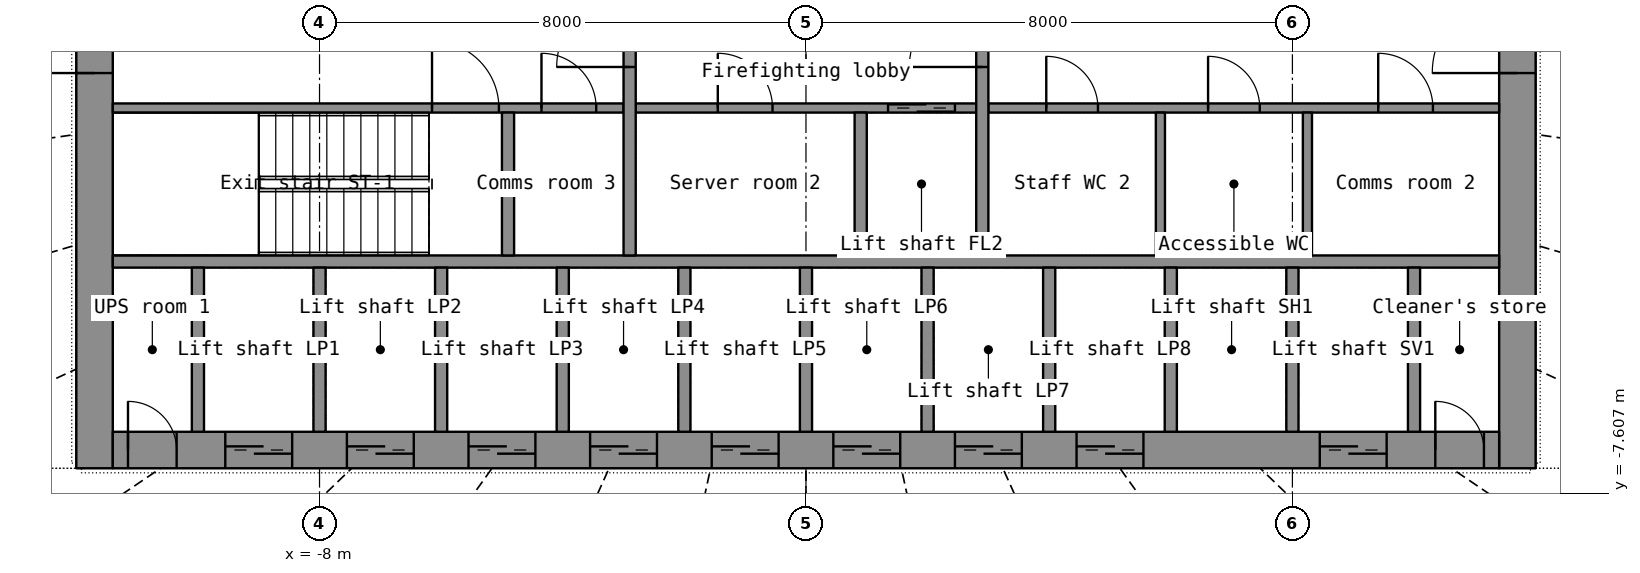
"""IFC4 building model, lengths in metres.
Left out: names, types, materials, properties, quantities, classifications, styles, units other than length and angle.
Written with IfcOpenShell. Run it as: python <this file> out.ifc"""

import sys

from ifc_helpers import new_model, si_unit, direction, frame, frame_2d, origin, place, context, subcontext, project, spatial, rectangle, extrude, element, fill, save


model = new_model("IFC4")
c1 = context("Model", 3, precision=1e-05, world=origin(), true_north=direction((0.0, 1.0)))
c2 = subcontext(c1, "Body", "Model", "MODEL_VIEW")
j1 = project(units=[si_unit("LENGTHUNIT", "METRE"), si_unit("PLANEANGLEUNIT", "RADIAN")], contexts=[c1])
p1 = place(None, origin())
s1 = spatial("IfcSite", under=j1, at=p1, CompositionType="ELEMENT")
p2 = place(p1, origin())
s2 = spatial("IfcBuilding", under=s1, at=p2, CompositionType="ELEMENT")
p3 = place(p2, frame((0.0, 0.0, 44.5)))
s3 = spatial("IfcBuildingStorey", under=s2, at=p3, CompositionType="ELEMENT", Elevation=44.5)
p4 = place(p3, frame((-11.7, -7.2, 0.0), z_axis=(0.0, 0.0, 1.0), x_axis=(0.0, 1.0, 0.0)))
e1 = element("IfcWall", 1, at=p4, inside=s3, PredefinedType="SHEAR", context=c2, shape_type="SweptSolid", body=[
    extrude(rectangle(XDim=14.4, YDim=0.6, at=frame_2d((7.2, 0.0))), origin(), (0.0, 0.0, 1.0), 3.3),
])
p5 = place(p4, frame((6.5, 0.0, 0.0)))
e2 = element("IfcOpeningElement", 2, at=p5, cuts=e1, PredefinedType="OPENING", context=c2, shape_type="SweptSolid", body=[
    extrude(rectangle(XDim=1.4, YDim=2.2, at=frame_2d((0.7, 1.1))), frame((0.0, 0.31, 0.0), z_axis=(0.0, -1.0, 0.0), x_axis=(1.0, 0.0, 0.0)), (0.0, 0.0, 1.0), 0.62),
])
p6 = place(p3, frame((11.7, -7.2, 0.0), z_axis=(0.0, 0.0, 1.0), x_axis=(0.0, 1.0, 0.0)))
e3 = element("IfcWall", 3, at=p6, inside=s3, PredefinedType="SHEAR", context=c2, shape_type="SweptSolid", body=[
    extrude(rectangle(XDim=14.4, YDim=0.6, at=frame_2d((7.2, 0.0))), origin(), (0.0, 0.0, 1.0), 3.3),
])
p7 = place(p6, frame((6.5, 0.0, 0.0)))
e4 = element("IfcOpeningElement", 4, at=p7, cuts=e3, PredefinedType="OPENING", context=c2, shape_type="SweptSolid", body=[
    extrude(rectangle(XDim=1.4, YDim=2.2, at=frame_2d((0.7, 1.1))), frame((0.0, 0.31, 0.0), z_axis=(0.0, -1.0, 0.0), x_axis=(1.0, 0.0, 0.0)), (0.0, 0.0, 1.0), 0.62),
])
p8 = place(p3, frame((-11.4, -6.9, 0.0), z_axis=(0.0, 0.0, 1.0), x_axis=(1.0, 0.0, 0.0)))
e5 = element("IfcWall", 5, at=p8, inside=s3, PredefinedType="SHEAR", context=c2, shape_type="SweptSolid", body=[
    extrude(rectangle(XDim=22.8, YDim=0.6, at=frame_2d((11.4, 0.0))), origin(), (0.0, 0.0, 1.0), 3.3),
])
p9 = place(p8, frame((1.85, 0.0, 0.0)))
e6 = element("IfcOpeningElement", 6, at=p9, cuts=e5, PredefinedType="OPENING", context=c2, shape_type="SweptSolid", body=[
    extrude(rectangle(XDim=1.1, YDim=2.2, at=frame_2d((0.55, 1.1))), frame((0.0, 0.31, 0.0), z_axis=(0.0, -1.0, 0.0), x_axis=(1.0, 0.0, 0.0)), (0.0, 0.0, 1.0), 0.62),
])
p10 = place(p8, frame((3.85, 0.0, 0.0)))
e7 = element("IfcOpeningElement", 7, at=p10, cuts=e5, PredefinedType="OPENING", context=c2, shape_type="SweptSolid", body=[
    extrude(rectangle(XDim=1.1, YDim=2.2, at=frame_2d((0.55, 1.1))), frame((0.0, 0.31, 0.0), z_axis=(0.0, -1.0, 0.0), x_axis=(1.0, 0.0, 0.0)), (0.0, 0.0, 1.0), 0.62),
])
p11 = place(p8, frame((5.85, 0.0, 0.0)))
e8 = element("IfcOpeningElement", 8, at=p11, cuts=e5, PredefinedType="OPENING", context=c2, shape_type="SweptSolid", body=[
    extrude(rectangle(XDim=1.1, YDim=2.2, at=frame_2d((0.55, 1.1))), frame((0.0, 0.31, 0.0), z_axis=(0.0, -1.0, 0.0), x_axis=(1.0, 0.0, 0.0)), (0.0, 0.0, 1.0), 0.62),
])
p12 = place(p8, frame((7.85, 0.0, 0.0)))
e9 = element("IfcOpeningElement", 9, at=p12, cuts=e5, PredefinedType="OPENING", context=c2, shape_type="SweptSolid", body=[
    extrude(rectangle(XDim=1.1, YDim=2.2, at=frame_2d((0.55, 1.1))), frame((0.0, 0.31, 0.0), z_axis=(0.0, -1.0, 0.0), x_axis=(1.0, 0.0, 0.0)), (0.0, 0.0, 1.0), 0.62),
])
p13 = place(p8, frame((9.85, 0.0, 0.0)))
e10 = element("IfcOpeningElement", 10, at=p13, cuts=e5, PredefinedType="OPENING", context=c2, shape_type="SweptSolid", body=[
    extrude(rectangle(XDim=1.1, YDim=2.2, at=frame_2d((0.55, 1.1))), frame((0.0, 0.31, 0.0), z_axis=(0.0, -1.0, 0.0), x_axis=(1.0, 0.0, 0.0)), (0.0, 0.0, 1.0), 0.62),
])
p14 = place(p8, frame((11.85, 0.0, 0.0)))
e11 = element("IfcOpeningElement", 11, at=p14, cuts=e5, PredefinedType="OPENING", context=c2, shape_type="SweptSolid", body=[
    extrude(rectangle(XDim=1.1, YDim=2.2, at=frame_2d((0.55, 1.1))), frame((0.0, 0.31, 0.0), z_axis=(0.0, -1.0, 0.0), x_axis=(1.0, 0.0, 0.0)), (0.0, 0.0, 1.0), 0.62),
])
p15 = place(p8, frame((13.85, 0.0, 0.0)))
e12 = element("IfcOpeningElement", 12, at=p15, cuts=e5, PredefinedType="OPENING", context=c2, shape_type="SweptSolid", body=[
    extrude(rectangle(XDim=1.1, YDim=2.2, at=frame_2d((0.55, 1.1))), frame((0.0, 0.31, 0.0), z_axis=(0.0, -1.0, 0.0), x_axis=(1.0, 0.0, 0.0)), (0.0, 0.0, 1.0), 0.62),
])
p16 = place(p8, frame((15.85, 0.0, 0.0)))
e13 = element("IfcOpeningElement", 13, at=p16, cuts=e5, PredefinedType="OPENING", context=c2, shape_type="SweptSolid", body=[
    extrude(rectangle(XDim=1.1, YDim=2.2, at=frame_2d((0.55, 1.1))), frame((0.0, 0.31, 0.0), z_axis=(0.0, -1.0, 0.0), x_axis=(1.0, 0.0, 0.0)), (0.0, 0.0, 1.0), 0.62),
])
p17 = place(p8, frame((19.85, 0.0, 0.0)))
e14 = element("IfcOpeningElement", 14, at=p17, cuts=e5, PredefinedType="OPENING", context=c2, shape_type="SweptSolid", body=[
    extrude(rectangle(XDim=1.1, YDim=2.2, at=frame_2d((0.55, 1.1))), frame((0.0, 0.31, 0.0), z_axis=(0.0, -1.0, 0.0), x_axis=(1.0, 0.0, 0.0)), (0.0, 0.0, 1.0), 0.62),
])
p18 = place(p8, frame((0.25, 0.0, 0.0)))
e15 = element("IfcOpeningElement", 15, at=p18, cuts=e5, PredefinedType="OPENING", context=c2, shape_type="SweptSolid", body=[
    extrude(rectangle(XDim=0.8, YDim=2.05, at=frame_2d((0.4, 1.025))), frame((0.0, 0.31, 0.0), z_axis=(0.0, -1.0, 0.0), x_axis=(1.0, 0.0, 0.0)), (0.0, 0.0, 1.0), 0.62),
])
p19 = place(p8, frame((21.75, 0.0, 0.0)))
e16 = element("IfcOpeningElement", 16, at=p19, cuts=e5, PredefinedType="OPENING", context=c2, shape_type="SweptSolid", body=[
    extrude(rectangle(XDim=0.8, YDim=2.05, at=frame_2d((0.4, 1.025))), frame((0.0, 0.31, 0.0), z_axis=(0.0, -1.0, 0.0), x_axis=(1.0, 0.0, 0.0)), (0.0, 0.0, 1.0), 0.62),
])
p20 = place(p3, frame((-11.4, -3.8, 0.0), z_axis=(0.0, 0.0, 1.0), x_axis=(1.0, 0.0, 0.0)))
e17 = element("IfcWall", 17, at=p20, inside=s3, PredefinedType="SHEAR", context=c2, shape_type="SweptSolid", body=[
    extrude(rectangle(XDim=22.8, YDim=0.2, at=frame_2d((11.4, 0.0))), origin(), (0.0, 0.0, 1.0), 3.3),
])
for number, where, z_axis, x_axis in (
    (18, (-10.0, -6.6, 0.0), (0.0, 0.0, 1.0), (0.0, 1.0, 0.0)),
    (19, (-8.0, -6.6, 0.0), (0.0, 0.0, 1.0), (0.0, 1.0, 0.0)),
    (20, (-6.0, -6.6, 0.0), (0.0, 0.0, 1.0), (0.0, 1.0, 0.0)),
    (21, (-4.0, -6.6, 0.0), (0.0, 0.0, 1.0), (0.0, 1.0, 0.0)),
    (22, (-2.0, -6.6, 0.0), (0.0, 0.0, 1.0), (0.0, 1.0, 0.0)),
    (23, (0.0, -6.6, 0.0), (0.0, 0.0, 1.0), (0.0, 1.0, 0.0)),
    (24, (2.0, -6.6, 0.0), (0.0, 0.0, 1.0), (0.0, 1.0, 0.0)),
    (25, (4.0, -6.6, 0.0), (0.0, 0.0, 1.0), (0.0, 1.0, 0.0)),
    (26, (6.0, -6.6, 0.0), (0.0, 0.0, 1.0), (0.0, 1.0, 0.0)),
    (27, (8.0, -6.6, 0.0), (0.0, 0.0, 1.0), (0.0, 1.0, 0.0)),
    (28, (10.0, -6.6, 0.0), (0.0, 0.0, 1.0), (0.0, 1.0, 0.0)),
):
    element("IfcWall", number, at=place(p3, frame(where, z_axis=z_axis, x_axis=x_axis)), inside=s3, PredefinedType="SHEAR", context=c2, shape_type="SweptSolid", body=[
        extrude(rectangle(XDim=2.7, YDim=0.2, at=frame_2d((1.35, 0.0))), origin(), (0.0, 0.0, 1.0), 3.3),
    ])
p21 = place(p3, frame((-11.4, -1.275, 0.0), z_axis=(0.0, 0.0, 1.0), x_axis=(1.0, 0.0, 0.0)))
e29 = element("IfcWall", 29, at=p21, inside=s3, PredefinedType="SHEAR", context=c2, shape_type="SweptSolid", body=[
    extrude(rectangle(XDim=8.4, YDim=0.15, at=frame_2d((4.2, 0.0))), origin(), (0.0, 0.0, 1.0), 3.3),
])
p22 = place(p21, frame((5.25, 0.0, 0.0)))
e30 = element("IfcOpeningElement", 30, at=p22, cuts=e29, PredefinedType="OPENING", context=c2, shape_type="SweptSolid", body=[
    extrude(rectangle(XDim=1.1, YDim=2.15, at=frame_2d((0.55, 1.075))), frame((0.0, 0.085, 0.0), z_axis=(0.0, -1.0, 0.0), x_axis=(1.0, 0.0, 0.0)), (0.0, 0.0, 1.0), 0.17),
])
p23 = place(p21, frame((7.05, 0.0, 0.0)))
e31 = element("IfcOpeningElement", 31, at=p23, cuts=e29, PredefinedType="OPENING", context=c2, shape_type="SweptSolid", body=[
    extrude(rectangle(XDim=0.9, YDim=2.1, at=frame_2d((0.45, 1.05))), frame((0.0, 0.085, 0.0), z_axis=(0.0, -1.0, 0.0), x_axis=(1.0, 0.0, 0.0)), (0.0, 0.0, 1.0), 0.17),
])
p24 = place(p3, frame((-2.8, -1.275, 0.0), z_axis=(0.0, 0.0, 1.0), x_axis=(1.0, 0.0, 0.0)))
e32 = element("IfcWall", 32, at=p24, inside=s3, PredefinedType="SHEAR", context=c2, shape_type="SweptSolid", body=[
    extrude(rectangle(XDim=5.6, YDim=0.15, at=frame_2d((2.8, 0.0))), origin(), (0.0, 0.0, 1.0), 3.3),
])
p25 = place(p24, frame((4.15, 0.0, 0.0)))
e33 = element("IfcOpeningElement", 33, at=p25, cuts=e32, PredefinedType="OPENING", context=c2, shape_type="SweptSolid", body=[
    extrude(rectangle(XDim=1.1, YDim=2.2, at=frame_2d((0.55, 1.1))), frame((0.0, 0.085, 0.0), z_axis=(0.0, -1.0, 0.0), x_axis=(1.0, 0.0, 0.0)), (0.0, 0.0, 1.0), 0.17),
])
p26 = place(p24, frame((1.35, 0.0, 0.0)))
e34 = element("IfcOpeningElement", 34, at=p26, cuts=e32, PredefinedType="OPENING", context=c2, shape_type="SweptSolid", body=[
    extrude(rectangle(XDim=0.9, YDim=2.1, at=frame_2d((0.45, 1.05))), frame((0.0, 0.085, 0.0), z_axis=(0.0, -1.0, 0.0), x_axis=(1.0, 0.0, 0.0)), (0.0, 0.0, 1.0), 0.17),
])
p27 = place(p3, frame((3.0, -1.275, 0.0), z_axis=(0.0, 0.0, 1.0), x_axis=(1.0, 0.0, 0.0)))
e35 = element("IfcWall", 35, at=p27, inside=s3, PredefinedType="PARTITIONING", context=c2, shape_type="SweptSolid", body=[
    extrude(rectangle(XDim=8.4, YDim=0.15, at=frame_2d((4.2, 0.0))), origin(), (0.0, 0.0, 1.0), 3.3),
])
p28 = place(p27, frame((0.952, 0.0, 0.0)))
e36 = element("IfcOpeningElement", 36, at=p28, cuts=e35, PredefinedType="OPENING", context=c2, shape_type="SweptSolid", body=[
    extrude(rectangle(XDim=0.85, YDim=2.1, at=frame_2d((0.425, 1.05))), frame((0.0, 0.085, 0.0), z_axis=(0.0, -1.0, 0.0), x_axis=(1.0, 0.0, 0.0)), (0.0, 0.0, 1.0), 0.17),
])
p29 = place(p27, frame((3.613, 0.0, 0.0)))
e37 = element("IfcOpeningElement", 37, at=p29, cuts=e35, PredefinedType="OPENING", context=c2, shape_type="SweptSolid", body=[
    extrude(rectangle(XDim=0.85, YDim=2.1, at=frame_2d((0.425, 1.05))), frame((0.0, 0.085, 0.0), z_axis=(0.0, -1.0, 0.0), x_axis=(1.0, 0.0, 0.0)), (0.0, 0.0, 1.0), 0.17),
])
p30 = place(p27, frame((6.411, 0.0, 0.0)))
e38 = element("IfcOpeningElement", 38, at=p30, cuts=e35, PredefinedType="OPENING", context=c2, shape_type="SweptSolid", body=[
    extrude(rectangle(XDim=0.9, YDim=2.1, at=frame_2d((0.45, 1.05))), frame((0.0, 0.085, 0.0), z_axis=(0.0, -1.0, 0.0), x_axis=(1.0, 0.0, 0.0)), (0.0, 0.0, 1.0), 0.17),
])
p31 = place(p3, frame((-2.9, -3.7, 0.0), z_axis=(0.0, 0.0, 1.0), x_axis=(0.0, 1.0, 0.0)))
e39 = element("IfcWall", 39, at=p31, inside=s3, PredefinedType="SHEAR", context=c2, shape_type="SweptSolid", body=[
    extrude(rectangle(XDim=7.4, YDim=0.2, at=frame_2d((3.7, 0.0))), origin(), (0.0, 0.0, 1.0), 3.3),
])
p32 = place(p31, frame((3.1, 0.0, 0.0)))
e40 = element("IfcOpeningElement", 40, at=p32, cuts=e39, PredefinedType="OPENING", context=c2, shape_type="SweptSolid", body=[
    extrude(rectangle(XDim=1.2, YDim=2.2, at=frame_2d((0.6, 1.1))), frame((0.0, 0.11, 0.0), z_axis=(0.0, -1.0, 0.0), x_axis=(1.0, 0.0, 0.0)), (0.0, 0.0, 1.0), 0.22),
])
p33 = place(p3, frame((2.9, -3.7, 0.0), z_axis=(0.0, 0.0, 1.0), x_axis=(0.0, 1.0, 0.0)))
e41 = element("IfcWall", 41, at=p33, inside=s3, PredefinedType="SHEAR", context=c2, shape_type="SweptSolid", body=[
    extrude(rectangle(XDim=7.4, YDim=0.2, at=frame_2d((3.7, 0.0))), origin(), (0.0, 0.0, 1.0), 3.3),
])
p34 = place(p33, frame((3.1, 0.0, 0.0)))
e42 = element("IfcOpeningElement", 42, at=p34, cuts=e41, PredefinedType="OPENING", context=c2, shape_type="SweptSolid", body=[
    extrude(rectangle(XDim=1.2, YDim=2.2, at=frame_2d((0.6, 1.1))), frame((0.0, 0.11, 0.0), z_axis=(0.0, -1.0, 0.0), x_axis=(1.0, 0.0, 0.0)), (0.0, 0.0, 1.0), 0.22),
])
for number, where, z_axis, x_axis in (
    (43, (0.9, -3.7, 0.0), (0.0, 0.0, 1.0), (0.0, 1.0, 0.0)),
    (44, (-4.9, -3.7, 0.0), (0.0, 0.0, 1.0), (0.0, 1.0, 0.0)),
):
    element("IfcWall", number, at=place(p3, frame(where, z_axis=z_axis, x_axis=x_axis)), inside=s3, PredefinedType="SHEAR", context=c2, shape_type="SweptSolid", body=[
        extrude(rectangle(XDim=2.35, YDim=0.2, at=frame_2d((1.175, 0.0))), origin(), (0.0, 0.0, 1.0), 3.3),
    ])
for number, where, z_axis, x_axis in (
    (45, (5.829, -3.7, 0.0), (0.0, 0.0, 1.0), (0.0, 1.0, 0.0)),
    (46, (8.247, -3.7, 0.0), (0.0, 0.0, 1.0), (0.0, 1.0, 0.0)),
):
    element("IfcWall", number, at=place(p3, frame(where, z_axis=z_axis, x_axis=x_axis)), inside=s3, PredefinedType="PARTITIONING", context=c2, shape_type="SweptSolid", body=[
        extrude(rectangle(XDim=2.35, YDim=0.15, at=frame_2d((1.175, 0.0))), origin(), (0.0, 0.0, 1.0), 3.3),
    ])
p35 = place(p9, origin())
e47 = element("IfcDoor", 47, at=p35, inside=s3, OperationType="DOUBLE_DOOR_SLIDING", PredefinedType="DOOR", context=c2, shape_type="SweptSolid", body=[
    extrude(rectangle(XDim=1.1, YDim=2.2, at=frame_2d((0.55, 1.1))), frame((0.0, 0.025, 0.0), z_axis=(0.0, -1.0, 0.0), x_axis=(1.0, 0.0, 0.0)), (0.0, 0.0, 1.0), 0.05),
])
fill(e6, e47)
p36 = place(p10, origin())
e48 = element("IfcDoor", 48, at=p36, inside=s3, OperationType="DOUBLE_DOOR_SLIDING", PredefinedType="DOOR", context=c2, shape_type="SweptSolid", body=[
    extrude(rectangle(XDim=1.1, YDim=2.2, at=frame_2d((0.55, 1.1))), frame((0.0, 0.025, 0.0), z_axis=(0.0, -1.0, 0.0), x_axis=(1.0, 0.0, 0.0)), (0.0, 0.0, 1.0), 0.05),
])
fill(e7, e48)
p37 = place(p11, origin())
e49 = element("IfcDoor", 49, at=p37, inside=s3, OperationType="DOUBLE_DOOR_SLIDING", PredefinedType="DOOR", context=c2, shape_type="SweptSolid", body=[
    extrude(rectangle(XDim=1.1, YDim=2.2, at=frame_2d((0.55, 1.1))), frame((0.0, 0.025, 0.0), z_axis=(0.0, -1.0, 0.0), x_axis=(1.0, 0.0, 0.0)), (0.0, 0.0, 1.0), 0.05),
])
fill(e8, e49)
p38 = place(p12, origin())
e50 = element("IfcDoor", 50, at=p38, inside=s3, OperationType="DOUBLE_DOOR_SLIDING", PredefinedType="DOOR", context=c2, shape_type="SweptSolid", body=[
    extrude(rectangle(XDim=1.1, YDim=2.2, at=frame_2d((0.55, 1.1))), frame((0.0, 0.025, 0.0), z_axis=(0.0, -1.0, 0.0), x_axis=(1.0, 0.0, 0.0)), (0.0, 0.0, 1.0), 0.05),
])
fill(e9, e50)
p39 = place(p13, origin())
e51 = element("IfcDoor", 51, at=p39, inside=s3, OperationType="DOUBLE_DOOR_SLIDING", PredefinedType="DOOR", context=c2, shape_type="SweptSolid", body=[
    extrude(rectangle(XDim=1.1, YDim=2.2, at=frame_2d((0.55, 1.1))), frame((0.0, 0.025, 0.0), z_axis=(0.0, -1.0, 0.0), x_axis=(1.0, 0.0, 0.0)), (0.0, 0.0, 1.0), 0.05),
])
fill(e10, e51)
p40 = place(p14, origin())
e52 = element("IfcDoor", 52, at=p40, inside=s3, OperationType="DOUBLE_DOOR_SLIDING", PredefinedType="DOOR", context=c2, shape_type="SweptSolid", body=[
    extrude(rectangle(XDim=1.1, YDim=2.2, at=frame_2d((0.55, 1.1))), frame((0.0, 0.025, 0.0), z_axis=(0.0, -1.0, 0.0), x_axis=(1.0, 0.0, 0.0)), (0.0, 0.0, 1.0), 0.05),
])
fill(e11, e52)
p41 = place(p15, origin())
e53 = element("IfcDoor", 53, at=p41, inside=s3, OperationType="DOUBLE_DOOR_SLIDING", PredefinedType="DOOR", context=c2, shape_type="SweptSolid", body=[
    extrude(rectangle(XDim=1.1, YDim=2.2, at=frame_2d((0.55, 1.1))), frame((0.0, 0.025, 0.0), z_axis=(0.0, -1.0, 0.0), x_axis=(1.0, 0.0, 0.0)), (0.0, 0.0, 1.0), 0.05),
])
fill(e12, e53)
p42 = place(p16, origin())
e54 = element("IfcDoor", 54, at=p42, inside=s3, OperationType="DOUBLE_DOOR_SLIDING", PredefinedType="DOOR", context=c2, shape_type="SweptSolid", body=[
    extrude(rectangle(XDim=1.1, YDim=2.2, at=frame_2d((0.55, 1.1))), frame((0.0, 0.025, 0.0), z_axis=(0.0, -1.0, 0.0), x_axis=(1.0, 0.0, 0.0)), (0.0, 0.0, 1.0), 0.05),
])
fill(e13, e54)
p43 = place(p17, origin())
e55 = element("IfcDoor", 55, at=p43, inside=s3, OperationType="DOUBLE_DOOR_SLIDING", PredefinedType="DOOR", context=c2, shape_type="SweptSolid", body=[
    extrude(rectangle(XDim=1.1, YDim=2.2, at=frame_2d((0.55, 1.1))), frame((0.0, 0.025, 0.0), z_axis=(0.0, -1.0, 0.0), x_axis=(1.0, 0.0, 0.0)), (0.0, 0.0, 1.0), 0.05),
])
fill(e14, e55)
p44 = place(p18, origin())
e56 = element("IfcDoor", 56, at=p44, inside=s3, OperationType="SINGLE_SWING_LEFT", PredefinedType="DOOR", context=c2, shape_type="SweptSolid", body=[
    extrude(rectangle(XDim=0.8, YDim=2.05, at=frame_2d((0.4, 1.025))), frame((0.0, 0.025, 0.0), z_axis=(0.0, -1.0, 0.0), x_axis=(1.0, 0.0, 0.0)), (0.0, 0.0, 1.0), 0.05),
])
fill(e15, e56)
p45 = place(p19, origin())
e57 = element("IfcDoor", 57, at=p45, inside=s3, OperationType="SINGLE_SWING_LEFT", PredefinedType="DOOR", context=c2, shape_type="SweptSolid", body=[
    extrude(rectangle(XDim=0.8, YDim=2.05, at=frame_2d((0.4, 1.025))), frame((0.0, 0.025, 0.0), z_axis=(0.0, -1.0, 0.0), x_axis=(1.0, 0.0, 0.0)), (0.0, 0.0, 1.0), 0.05),
])
fill(e16, e57)
p46 = place(p5, origin())
e58 = element("IfcDoor", 58, at=p46, inside=s3, OperationType="DOUBLE_DOOR_SINGLE_SWING", PredefinedType="DOOR", context=c2, shape_type="SweptSolid", body=[
    extrude(rectangle(XDim=1.4, YDim=2.2, at=frame_2d((0.7, 1.1))), frame((0.0, 0.025, 0.0), z_axis=(0.0, -1.0, 0.0), x_axis=(1.0, 0.0, 0.0)), (0.0, 0.0, 1.0), 0.05),
])
fill(e2, e58)
p47 = place(p7, origin())
e59 = element("IfcDoor", 59, at=p47, inside=s3, OperationType="DOUBLE_DOOR_SINGLE_SWING", PredefinedType="DOOR", context=c2, shape_type="SweptSolid", body=[
    extrude(rectangle(XDim=1.4, YDim=2.2, at=frame_2d((0.7, 1.1))), frame((0.0, 0.025, 0.0), z_axis=(0.0, -1.0, 0.0), x_axis=(1.0, 0.0, 0.0)), (0.0, 0.0, 1.0), 0.05),
])
fill(e4, e59)
p48 = place(p32, origin())
e60 = element("IfcDoor", 60, at=p48, inside=s3, OperationType="SINGLE_SWING_LEFT", PredefinedType="DOOR", context=c2, shape_type="SweptSolid", body=[
    extrude(rectangle(XDim=1.2, YDim=2.2, at=frame_2d((0.6, 1.1))), frame((0.0, 0.025, 0.0), z_axis=(0.0, -1.0, 0.0), x_axis=(1.0, 0.0, 0.0)), (0.0, 0.0, 1.0), 0.05),
])
fill(e40, e60)
p49 = place(p34, origin())
e61 = element("IfcDoor", 61, at=p49, inside=s3, OperationType="SINGLE_SWING_LEFT", PredefinedType="DOOR", context=c2, shape_type="SweptSolid", body=[
    extrude(rectangle(XDim=1.2, YDim=2.2, at=frame_2d((0.6, 1.1))), frame((0.0, 0.025, 0.0), z_axis=(0.0, -1.0, 0.0), x_axis=(1.0, 0.0, 0.0)), (0.0, 0.0, 1.0), 0.05),
])
fill(e42, e61)
p50 = place(p25, origin())
e62 = element("IfcDoor", 62, at=p50, inside=s3, OperationType="DOUBLE_DOOR_SLIDING", PredefinedType="DOOR", context=c2, shape_type="SweptSolid", body=[
    extrude(rectangle(XDim=1.1, YDim=2.2, at=frame_2d((0.55, 1.1))), frame((0.0, 0.025, 0.0), z_axis=(0.0, -1.0, 0.0), x_axis=(1.0, 0.0, 0.0)), (0.0, 0.0, 1.0), 0.05),
])
fill(e33, e62)
p51 = place(p22, origin())
e63 = element("IfcDoor", 63, at=p51, inside=s3, OperationType="SINGLE_SWING_LEFT", PredefinedType="DOOR", context=c2, shape_type="SweptSolid", body=[
    extrude(rectangle(XDim=1.1, YDim=2.15, at=frame_2d((0.55, 1.075))), frame((0.0, 0.025, 0.0), z_axis=(0.0, -1.0, 0.0), x_axis=(1.0, 0.0, 0.0)), (0.0, 0.0, 1.0), 0.05),
])
fill(e30, e63)
p52 = place(p28, origin())
e64 = element("IfcDoor", 64, at=p52, inside=s3, OperationType="SINGLE_SWING_LEFT", PredefinedType="DOOR", context=c2, shape_type="SweptSolid", body=[
    extrude(rectangle(XDim=0.85, YDim=2.1, at=frame_2d((0.425, 1.05))), frame((0.0, 0.025, 0.0), z_axis=(0.0, -1.0, 0.0), x_axis=(1.0, 0.0, 0.0)), (0.0, 0.0, 1.0), 0.05),
])
fill(e36, e64)
p53 = place(p29, origin())
e65 = element("IfcDoor", 65, at=p53, inside=s3, OperationType="SINGLE_SWING_LEFT", PredefinedType="DOOR", context=c2, shape_type="SweptSolid", body=[
    extrude(rectangle(XDim=0.85, YDim=2.1, at=frame_2d((0.425, 1.05))), frame((0.0, 0.025, 0.0), z_axis=(0.0, -1.0, 0.0), x_axis=(1.0, 0.0, 0.0)), (0.0, 0.0, 1.0), 0.05),
])
fill(e37, e65)
p54 = place(p30, origin())
e66 = element("IfcDoor", 66, at=p54, inside=s3, OperationType="SINGLE_SWING_LEFT", PredefinedType="DOOR", context=c2, shape_type="SweptSolid", body=[
    extrude(rectangle(XDim=0.9, YDim=2.1, at=frame_2d((0.45, 1.05))), frame((0.0, 0.025, 0.0), z_axis=(0.0, -1.0, 0.0), x_axis=(1.0, 0.0, 0.0)), (0.0, 0.0, 1.0), 0.05),
])
fill(e38, e66)
p55 = place(p26, origin())
e67 = element("IfcDoor", 67, at=p55, inside=s3, OperationType="SINGLE_SWING_LEFT", PredefinedType="DOOR", context=c2, shape_type="SweptSolid", body=[
    extrude(rectangle(XDim=0.9, YDim=2.1, at=frame_2d((0.45, 1.05))), frame((0.0, 0.025, 0.0), z_axis=(0.0, -1.0, 0.0), x_axis=(1.0, 0.0, 0.0)), (0.0, 0.0, 1.0), 0.05),
])
fill(e34, e67)
p56 = place(p23, origin())
e68 = element("IfcDoor", 68, at=p56, inside=s3, OperationType="SINGLE_SWING_LEFT", PredefinedType="DOOR", context=c2, shape_type="SweptSolid", body=[
    extrude(rectangle(XDim=0.9, YDim=2.1, at=frame_2d((0.45, 1.05))), frame((0.0, 0.025, 0.0), z_axis=(0.0, -1.0, 0.0), x_axis=(1.0, 0.0, 0.0)), (0.0, 0.0, 1.0), 0.05),
])
fill(e31, e68)
save(model, sys.argv[1])
